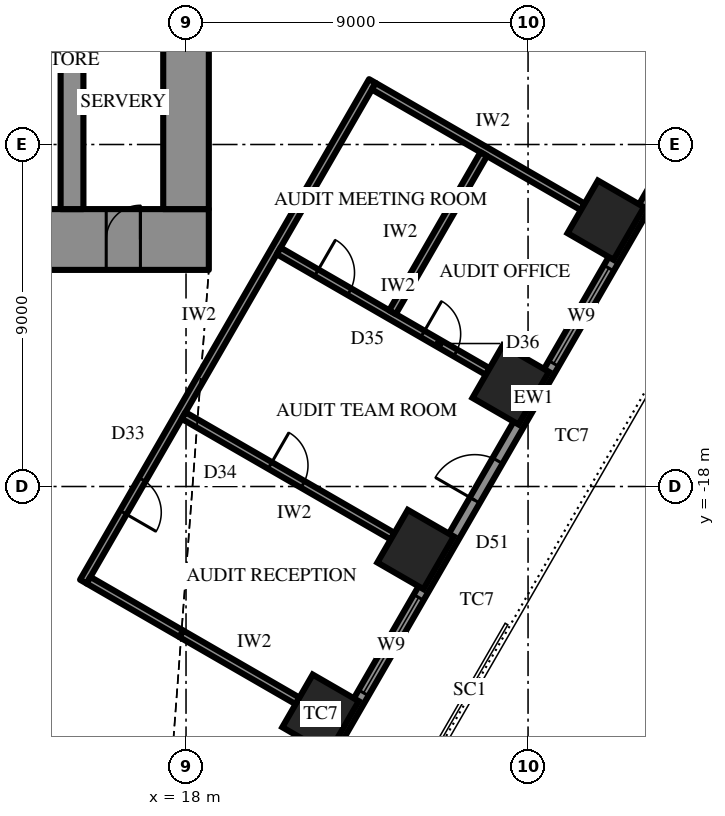
"""IFC4 building model, lengths in metres.
Left out: names, types, materials, properties, quantities, classifications, styles, units other than length and angle.
Written with IfcOpenShell. Run it as: python <this file> out.ifc"""

import sys

from ifc_helpers import new_model, si_unit, direction, frame, frame_2d, origin, origin_2d, place, context, subcontext, project, spatial, rectangle, extrude, element, fill, save


model = new_model("IFC4")
c1 = context("Model", 3, precision=1e-05, world=origin(), true_north=direction((0.0, 1.0)))
c2 = subcontext(c1, "Body", "Model", "MODEL_VIEW")
j1 = project(units=[si_unit("LENGTHUNIT", "METRE"), si_unit("PLANEANGLEUNIT", "RADIAN")], contexts=[c1])
p1 = place(None, origin())
s1 = spatial("IfcSite", under=j1, at=p1, CompositionType="ELEMENT")
p2 = place(p1, origin())
s2 = spatial("IfcBuilding", under=s1, at=p2, CompositionType="ELEMENT")
p3 = place(p2, frame((0.0, 0.0, 165.7)))
s3 = spatial("IfcBuildingStorey", under=s2, at=p3, CompositionType="ELEMENT", Elevation=165.7)
for number, where, z_axis, x_axis in (
    (1, (21.54, -23.992, 0.0), (0.0, 0.0, 1.0), (0.5, 0.866, 0.0)),
    (2, (24.042, -19.658, 0.0), (0.0, 0.0, 1.0), (0.5, 0.866, 0.0)),
    (3, (26.544, -15.325, 0.0), (0.0, 0.0, 1.0), (0.5, 0.866, 0.0)),
    (4, (29.045, -10.992, 0.0), (0.0, 0.0, 1.0), (0.5, 0.866, 0.0)),
):
    element("IfcColumn", number, at=place(p3, frame(where, z_axis=z_axis, x_axis=x_axis)), inside=s3, PredefinedType="COLUMN", context=c2, shape_type="SweptSolid", body=[
        extrude(rectangle(XDim=1.6, YDim=1.4, at=origin_2d()), origin(), (0.0, 0.0, 1.0), 4.2),
    ])
p4 = place(p3, frame((18.6, -11.5, 0.0), z_axis=(0.0, 0.0, 1.0), x_axis=(-1.0, 0.0, 0.0)))
e5 = element("IfcWall", 5, at=p4, inside=s3, PredefinedType="SHEAR", context=c2, shape_type="SweptSolid", body=[
    extrude(rectangle(XDim=37.2, YDim=1.6, at=frame_2d((18.6, 0.0))), origin(), (0.0, 0.0, 1.0), 4.2),
])
p5 = place(p4, frame((19.45, 0.0, 0.0)))
e6 = element("IfcOpeningElement", 6, at=p5, cuts=e5, PredefinedType="OPENING", context=c2, shape_type="SweptSolid", body=[
    extrude(rectangle(XDim=0.9, YDim=2.2, at=frame_2d((0.45, 1.1))), frame((0.0, 0.81, 0.0), z_axis=(0.0, -1.0, 0.0), x_axis=(1.0, 0.0, 0.0)), (0.0, 0.0, 1.0), 1.62),
])
p6 = place(p4, frame((22.45, 0.0, 0.0)))
e7 = element("IfcOpeningElement", 7, at=p6, cuts=e5, PredefinedType="OPENING", context=c2, shape_type="SweptSolid", body=[
    extrude(rectangle(XDim=0.9, YDim=2.2, at=frame_2d((0.45, 1.1))), frame((0.0, 0.81, 0.0), z_axis=(0.0, -1.0, 0.0), x_axis=(1.0, 0.0, 0.0)), (0.0, 0.0, 1.0), 1.62),
])
p7 = place(p4, frame((25.5, 0.0, 0.0)))
e8 = element("IfcOpeningElement", 8, at=p7, cuts=e5, PredefinedType="OPENING", context=c2, shape_type="SweptSolid", body=[
    extrude(rectangle(XDim=1.0, YDim=2.2, at=frame_2d((0.5, 1.1))), frame((0.0, 0.81, 0.0), z_axis=(0.0, -1.0, 0.0), x_axis=(1.0, 0.0, 0.0)), (0.0, 0.0, 1.0), 1.62),
])
p8 = place(p4, frame((1.8, 0.0, 0.0)))
e9 = element("IfcOpeningElement", 9, at=p8, cuts=e5, PredefinedType="OPENING", context=c2, shape_type="SweptSolid", body=[
    extrude(rectangle(XDim=0.9, YDim=2.2, at=frame_2d((0.45, 1.1))), frame((0.0, 0.81, 0.0), z_axis=(0.0, -1.0, 0.0), x_axis=(1.0, 0.0, 0.0)), (0.0, 0.0, 1.0), 1.62),
])
p9 = place(p4, frame((4.65, 0.0, 0.0)))
e10 = element("IfcOpeningElement", 10, at=p9, cuts=e5, PredefinedType="OPENING", context=c2, shape_type="SweptSolid", body=[
    extrude(rectangle(XDim=0.9, YDim=2.2, at=frame_2d((0.45, 1.1))), frame((0.0, 0.81, 0.0), z_axis=(0.0, -1.0, 0.0), x_axis=(1.0, 0.0, 0.0)), (0.0, 0.0, 1.0), 1.62),
])
p10 = place(p4, frame((7.75, 0.0, 0.0)))
e11 = element("IfcOpeningElement", 11, at=p10, cuts=e5, PredefinedType="OPENING", context=c2, shape_type="SweptSolid", body=[
    extrude(rectangle(XDim=0.9, YDim=2.2, at=frame_2d((0.45, 1.1))), frame((0.0, 0.81, 0.0), z_axis=(0.0, -1.0, 0.0), x_axis=(1.0, 0.0, 0.0)), (0.0, 0.0, 1.0), 1.62),
])
p11 = place(p4, frame((28.55, 0.0, 0.0)))
e12 = element("IfcOpeningElement", 12, at=p11, cuts=e5, PredefinedType="OPENING", context=c2, shape_type="SweptSolid", body=[
    extrude(rectangle(XDim=0.9, YDim=2.2, at=frame_2d((0.45, 1.1))), frame((0.0, 0.81, 0.0), z_axis=(0.0, -1.0, 0.0), x_axis=(1.0, 0.0, 0.0)), (0.0, 0.0, 1.0), 1.62),
])
p12 = place(p4, frame((31.65, 0.0, 0.0)))
e13 = element("IfcOpeningElement", 13, at=p12, cuts=e5, PredefinedType="OPENING", context=c2, shape_type="SweptSolid", body=[
    extrude(rectangle(XDim=0.9, YDim=2.2, at=frame_2d((0.45, 1.1))), frame((0.0, 0.81, 0.0), z_axis=(0.0, -1.0, 0.0), x_axis=(1.0, 0.0, 0.0)), (0.0, 0.0, 1.0), 1.62),
])
p13 = place(p4, frame((34.5, 0.0, 0.0)))
e14 = element("IfcOpeningElement", 14, at=p13, cuts=e5, PredefinedType="OPENING", context=c2, shape_type="SweptSolid", body=[
    extrude(rectangle(XDim=0.9, YDim=2.2, at=frame_2d((0.45, 1.1))), frame((0.0, 0.81, 0.0), z_axis=(0.0, -1.0, 0.0), x_axis=(1.0, 0.0, 0.0)), (0.0, 0.0, 1.0), 1.62),
])
p14 = place(p3, frame((18.0, -10.7, 0.0), z_axis=(0.0, 0.0, 1.0), x_axis=(0.0, 1.0, 0.0)))
e15 = element("IfcWall", 15, at=p14, inside=s3, PredefinedType="SHEAR", context=c2, shape_type="SweptSolid", body=[
    extrude(rectangle(XDim=21.4, YDim=1.2, at=frame_2d((10.7, 0.0))), origin(), (0.0, 0.0, 1.0), 4.2),
])
p15 = place(p14, frame((9.8, 0.0, 0.0)))
e16 = element("IfcOpeningElement", 16, at=p15, cuts=e15, PredefinedType="OPENING", context=c2, shape_type="SweptSolid", body=[
    extrude(rectangle(XDim=1.8, YDim=2.4, at=frame_2d((0.9, 1.2))), frame((0.0, 0.61, 0.0), z_axis=(0.0, -1.0, 0.0), x_axis=(1.0, 0.0, 0.0)), (0.0, 0.0, 1.0), 1.22),
])
p16 = place(p3, frame((15.0, -10.7, 0.0), z_axis=(0.0, 0.0, 1.0), x_axis=(0.0, 1.0, 0.0)))
e17 = element("IfcWall", 17, at=p16, inside=s3, PredefinedType="SHEAR", context=c2, shape_type="SweptSolid", body=[
    extrude(rectangle(XDim=21.4, YDim=0.6, at=frame_2d((10.7, 0.0))), origin(), (0.0, 0.0, 1.0), 4.2),
])
p17 = place(p16, frame((9.8, 0.0, 0.0)))
e18 = element("IfcOpeningElement", 18, at=p17, cuts=e17, PredefinedType="OPENING", context=c2, shape_type="SweptSolid", body=[
    extrude(rectangle(XDim=1.8, YDim=2.4, at=frame_2d((0.9, 1.2))), frame((0.0, 0.31, 0.0), z_axis=(0.0, -1.0, 0.0), x_axis=(1.0, 0.0, 0.0)), (0.0, 0.0, 1.0), 0.62),
])
p18 = place(p3, frame((19.644, -28.675, 0.0), z_axis=(0.0, 0.0, 1.0), x_axis=(0.500003084452, 0.866023622968, 0.0)))
e19 = element("IfcWall", 19, at=p18, inside=s3, PredefinedType="SOLIDWALL", context=c2, shape_type="SweptSolid", body=[
    extrude(rectangle(XDim=30.022, YDim=0.3, at=frame_2d((15.011, 0.0))), origin(), (0.0, 0.0, 1.0), 2.75),
])
p19 = place(p18, frame((1.052, 0.0, 0.6)))
e20 = element("IfcOpeningElement", 20, at=p19, cuts=e19, PredefinedType="OPENING", context=c2, shape_type="SweptSolid", body=[
    extrude(rectangle(XDim=2.9, YDim=1.9, at=frame_2d((1.45, 0.95))), frame((0.0, 0.16, 0.0), z_axis=(0.0, -1.0, 0.0), x_axis=(1.0, 0.0, 0.0)), (0.0, 0.0, 1.0), 0.32),
])
p20 = place(p18, frame((6.056, 0.0, 0.6)))
e21 = element("IfcOpeningElement", 21, at=p20, cuts=e19, PredefinedType="OPENING", context=c2, shape_type="SweptSolid", body=[
    extrude(rectangle(XDim=2.9, YDim=1.9, at=frame_2d((1.45, 0.95))), frame((0.0, 0.16, 0.0), z_axis=(0.0, -1.0, 0.0), x_axis=(1.0, 0.0, 0.0)), (0.0, 0.0, 1.0), 0.32),
])
p21 = place(p18, frame((11.909, 0.0, 0.0)))
e22 = element("IfcOpeningElement", 22, at=p21, cuts=e19, PredefinedType="OPENING", context=c2, shape_type="SweptSolid", body=[
    extrude(rectangle(XDim=1.2, YDim=2.4, at=frame_2d((0.6, 1.2))), frame((0.0, 0.16, 0.0), z_axis=(0.0, -1.0, 0.0), x_axis=(1.0, 0.0, 0.0)), (0.0, 0.0, 1.0), 0.32),
])
p22 = place(p18, frame((16.063, 0.0, 0.6)))
e23 = element("IfcOpeningElement", 23, at=p22, cuts=e19, PredefinedType="OPENING", context=c2, shape_type="SweptSolid", body=[
    extrude(rectangle(XDim=2.9, YDim=1.9, at=frame_2d((1.45, 0.95))), frame((0.0, 0.16, 0.0), z_axis=(0.0, -1.0, 0.0), x_axis=(1.0, 0.0, 0.0)), (0.0, 0.0, 1.0), 0.32),
])
p23 = place(p18, frame((21.067, 0.0, 0.6)))
e24 = element("IfcOpeningElement", 24, at=p23, cuts=e19, PredefinedType="OPENING", context=c2, shape_type="SweptSolid", body=[
    extrude(rectangle(XDim=2.9, YDim=1.9, at=frame_2d((1.45, 0.95))), frame((0.0, 0.16, 0.0), z_axis=(0.0, -1.0, 0.0), x_axis=(1.0, 0.0, 0.0)), (0.0, 0.0, 1.0), 0.32),
])
p24 = place(p18, frame((26.07, 0.0, 0.6)))
e25 = element("IfcOpeningElement", 25, at=p24, cuts=e19, PredefinedType="OPENING", context=c2, shape_type="SweptSolid", body=[
    extrude(rectangle(XDim=2.9, YDim=1.9, at=frame_2d((1.45, 0.95))), frame((0.0, 0.16, 0.0), z_axis=(0.0, -1.0, 0.0), x_axis=(1.0, 0.0, 0.0)), (0.0, 0.0, 1.0), 0.32),
])
p25 = place(p3, frame((15.298, -20.503, 0.0), z_axis=(0.0, 0.0, 1.0), x_axis=(0.500010972563, 0.86601906868, 0.0)))
e26 = element("IfcWall", 26, at=p25, inside=s3, PredefinedType="PARTITIONING", context=c2, shape_type="SweptSolid", body=[
    extrude(rectangle(XDim=15.211, YDim=0.2, at=frame_2d((7.605, 0.0))), origin(), (0.0, 0.0, 1.0), 4.0),
])
p26 = place(p25, frame((2.102, 0.0, 0.0)))
e27 = element("IfcOpeningElement", 27, at=p26, cuts=e26, PredefinedType="OPENING", context=c2, shape_type="SweptSolid", body=[
    extrude(rectangle(XDim=1.0, YDim=2.2, at=frame_2d((0.5, 1.1))), frame((0.0, 0.11, 0.0), z_axis=(0.0, -1.0, 0.0), x_axis=(1.0, 0.0, 0.0)), (0.0, 0.0, 1.0), 0.22),
])
p27 = place(p3, frame((15.435, -20.467, 0.0), z_axis=(0.0, 0.0, 1.0), x_axis=(0.866008320966, -0.500029587143, 0.0)))
e28 = element("IfcWall", 28, at=p27, inside=s3, PredefinedType="PARTITIONING", context=c2, shape_type="SweptSolid", body=[
    extrude(rectangle(XDim=2.821, YDim=0.2, at=frame_2d((1.411, 0.0))), origin(), (0.0, 0.0, 1.0), 4.0),
])
p28 = place(p3, frame((17.878, -21.877, 0.0), z_axis=(0.0, 0.0, 1.0), x_axis=(0.866033512162, -0.499985955615, 0.0)))
e29 = element("IfcWall", 29, at=p28, inside=s3, PredefinedType="PARTITIONING", context=c2, shape_type="SweptSolid", body=[
    extrude(rectangle(XDim=3.529, YDim=0.2, at=frame_2d((1.764, 0.0))), origin(), (0.0, 0.0, 1.0), 3.082),
])
p29 = place(p3, frame((17.936, -16.133, 0.0), z_axis=(0.0, 0.0, 1.0), x_axis=(0.866022320763, -0.500005339912, 0.0)))
e30 = element("IfcWall", 30, at=p29, inside=s3, PredefinedType="PARTITIONING", context=c2, shape_type="SweptSolid", body=[
    extrude(rectangle(XDim=6.35, YDim=0.2, at=frame_2d((3.175, 0.0))), origin(), (0.0, 0.0, 1.0), 3.082),
])
p30 = place(p29, frame((2.625, 0.0, 0.0)))
e31 = element("IfcOpeningElement", 31, at=p30, cuts=e30, PredefinedType="OPENING", context=c2, shape_type="SweptSolid", body=[
    extrude(rectangle(XDim=1.0, YDim=2.2, at=frame_2d((0.5, 1.1))), frame((0.0, 0.11, 0.0), z_axis=(0.0, -1.0, 0.0), x_axis=(1.0, 0.0, 0.0)), (0.0, 0.0, 1.0), 0.22),
])
p31 = place(p3, frame((20.438, -11.8, 0.0), z_axis=(0.0, 0.0, 1.0), x_axis=(0.866022320763, -0.500005339912, 0.0)))
e32 = element("IfcWall", 32, at=p31, inside=s3, PredefinedType="PARTITIONING", context=c2, shape_type="SweptSolid", body=[
    extrude(rectangle(XDim=6.35, YDim=0.2, at=frame_2d((3.175, 0.0))), origin(), (0.0, 0.0, 1.0), 4.0),
])
p32 = place(p31, frame((1.15, 0.0, 0.0)))
e33 = element("IfcOpeningElement", 33, at=p32, cuts=e32, PredefinedType="OPENING", context=c2, shape_type="SweptSolid", body=[
    extrude(rectangle(XDim=1.0, YDim=2.2, at=frame_2d((0.5, 1.1))), frame((0.0, 0.11, 0.0), z_axis=(0.0, -1.0, 0.0), x_axis=(1.0, 0.0, 0.0)), (0.0, 0.0, 1.0), 0.22),
])
p33 = place(p31, frame((4.375, 0.0, 0.0)))
e34 = element("IfcOpeningElement", 34, at=p33, cuts=e32, PredefinedType="OPENING", context=c2, shape_type="SweptSolid", body=[
    extrude(rectangle(XDim=1.0, YDim=2.2, at=frame_2d((0.5, 1.1))), frame((0.0, 0.11, 0.0), z_axis=(0.0, -1.0, 0.0), x_axis=(1.0, 0.0, 0.0)), (0.0, 0.0, 1.0), 0.22),
])
p34 = place(p3, frame((22.94, -7.467, 0.0), z_axis=(0.0, 0.0, 1.0), x_axis=(0.866022320763, -0.500005339912, 0.0)))
e35 = element("IfcWall", 35, at=p34, inside=s3, PredefinedType="PARTITIONING", context=c2, shape_type="SweptSolid", body=[
    extrude(rectangle(XDim=6.35, YDim=0.2, at=frame_2d((3.175, 0.0))), origin(), (0.0, 0.0, 1.0), 3.082),
])
p35 = place(p3, frame((23.433, -13.413, 0.0), z_axis=(0.0, 0.0, 1.0), x_axis=(0.499998147991, 0.86602647304, 0.0)))
e36 = element("IfcWall", 36, at=p35, inside=s3, PredefinedType="PARTITIONING", context=c2, shape_type="SweptSolid", body=[
    extrude(rectangle(XDim=4.804, YDim=0.2, at=frame_2d((2.402, 0.0))), origin(), (0.0, 0.0, 1.0), 4.0),
])
p36 = place(p20, origin())
e37 = element("IfcWindow", 37, at=p36, inside=s3, PartitioningType="SINGLE_PANEL", PredefinedType="WINDOW", context=c2, shape_type="SweptSolid", body=[
    extrude(rectangle(XDim=2.9, YDim=1.9, at=frame_2d((1.45, 0.95))), frame((0.0, 0.03, 0.0), z_axis=(0.0, -1.0, 0.0), x_axis=(1.0, 0.0, 0.0)), (0.0, 0.0, 1.0), 0.06),
])
fill(e21, e37)
p37 = place(p21, origin())
e38 = element("IfcDoor", 38, at=p37, inside=s3, OperationType="SINGLE_SWING_RIGHT", PredefinedType="DOOR", context=c2, shape_type="SweptSolid", body=[
    extrude(rectangle(XDim=1.2, YDim=2.4, at=frame_2d((0.6, 1.2))), frame((0.0, 0.025, 0.0), z_axis=(0.0, -1.0, 0.0), x_axis=(1.0, 0.0, 0.0)), (0.0, 0.0, 1.0), 0.05),
])
fill(e22, e38)
p38 = place(p22, origin())
e39 = element("IfcWindow", 39, at=p38, inside=s3, PartitioningType="SINGLE_PANEL", PredefinedType="WINDOW", context=c2, shape_type="SweptSolid", body=[
    extrude(rectangle(XDim=2.9, YDim=1.9, at=frame_2d((1.45, 0.95))), frame((0.0, 0.03, 0.0), z_axis=(0.0, -1.0, 0.0), x_axis=(1.0, 0.0, 0.0)), (0.0, 0.0, 1.0), 0.06),
])
fill(e23, e39)
p39 = place(p8, frame((0.9, 0.0, 0.0), z_axis=(0.0, 0.0, 1.0), x_axis=(-1.0, 0.0, 0.0)))
e40 = element("IfcDoor", 40, at=p39, inside=s3, OperationType="SINGLE_SWING_LEFT", PredefinedType="DOOR", context=c2, shape_type="SweptSolid", body=[
    extrude(rectangle(XDim=0.9, YDim=2.2, at=frame_2d((0.45, 1.1))), frame((0.0, 0.025, 0.0), z_axis=(0.0, -1.0, 0.0), x_axis=(1.0, 0.0, 0.0)), (0.0, 0.0, 1.0), 0.05),
])
fill(e9, e40)
p40 = place(p26, frame((1.0, 0.0, 0.0), z_axis=(0.0, 0.0, 1.0), x_axis=(-1.0, 0.0, 0.0)))
e41 = element("IfcDoor", 41, at=p40, inside=s3, OperationType="SINGLE_SWING_LEFT", PredefinedType="DOOR", context=c2, shape_type="SweptSolid", body=[
    extrude(rectangle(XDim=1.0, YDim=2.2, at=frame_2d((0.5, 1.1))), frame((0.0, 0.025, 0.0), z_axis=(0.0, -1.0, 0.0), x_axis=(1.0, 0.0, 0.0)), (0.0, 0.0, 1.0), 0.05),
])
fill(e27, e41)
p41 = place(p30, origin())
e42 = element("IfcDoor", 42, at=p41, inside=s3, OperationType="SINGLE_SWING_RIGHT", PredefinedType="DOOR", context=c2, shape_type="SweptSolid", body=[
    extrude(rectangle(XDim=1.0, YDim=2.2, at=frame_2d((0.5, 1.1))), frame((0.0, 0.025, 0.0), z_axis=(0.0, -1.0, 0.0), x_axis=(1.0, 0.0, 0.0)), (0.0, 0.0, 1.0), 0.05),
])
fill(e31, e42)
p42 = place(p32, origin())
e43 = element("IfcDoor", 43, at=p42, inside=s3, OperationType="SINGLE_SWING_RIGHT", PredefinedType="DOOR", context=c2, shape_type="SweptSolid", body=[
    extrude(rectangle(XDim=1.0, YDim=2.2, at=frame_2d((0.5, 1.1))), frame((0.0, 0.025, 0.0), z_axis=(0.0, -1.0, 0.0), x_axis=(1.0, 0.0, 0.0)), (0.0, 0.0, 1.0), 0.05),
])
fill(e33, e43)
p43 = place(p33, origin())
e44 = element("IfcDoor", 44, at=p43, inside=s3, OperationType="SINGLE_SWING_RIGHT", PredefinedType="DOOR", context=c2, shape_type="SweptSolid", body=[
    extrude(rectangle(XDim=1.0, YDim=2.2, at=frame_2d((0.5, 1.1))), frame((0.0, 0.025, 0.0), z_axis=(0.0, -1.0, 0.0), x_axis=(1.0, 0.0, 0.0)), (0.0, 0.0, 1.0), 0.05),
])
fill(e34, e44)
save(model, sys.argv[1])
